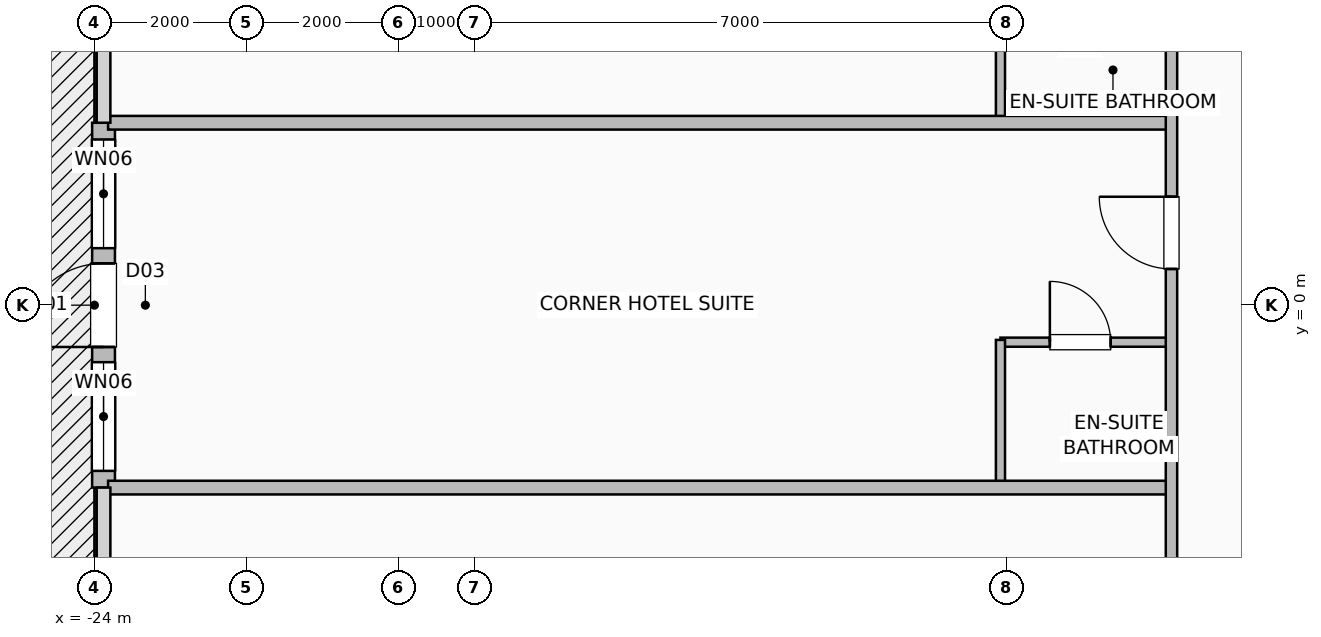
"""IFC4 building model, lengths in metres.
Left out: names, types, materials, properties, quantities, classifications, styles, units other than length and angle.
Written with IfcOpenShell. Run it as: python <this file> out.ifc"""

import sys

from ifc_helpers import new_model, si_unit, direction, frame, frame_2d, origin, place, context, subcontext, project, spatial, rectangle, extrude, element, fill, save


model = new_model("IFC4")
c1 = context("Model", 3, precision=1e-05, world=origin(), true_north=direction((0.0, 1.0)))
c2 = subcontext(c1, "Body", "Model", "MODEL_VIEW")
j1 = project(units=[si_unit("LENGTHUNIT", "METRE"), si_unit("PLANEANGLEUNIT", "RADIAN")], contexts=[c1])
p1 = place(None, origin())
s1 = spatial("IfcSite", under=j1, at=p1, CompositionType="ELEMENT")
p2 = place(p1, origin())
s2 = spatial("IfcBuilding", under=s1, at=p2, CompositionType="ELEMENT")
p3 = place(p2, frame((0.0, 0.0, 27.0)))
s3 = spatial("IfcBuildingStorey", under=s2, at=p3, CompositionType="ELEMENT", Elevation=27.0)
p4 = place(p3, frame((-23.88, -2.4, 0.0), z_axis=(0.0, 0.0, 1.0), x_axis=(0.0, 1.0, 0.0)))
e1 = element("IfcWall", 1, at=p4, inside=s3, PredefinedType="SOLIDWALL", context=c2, shape_type="SweptSolid", body=[
    extrude(rectangle(XDim=4.8, YDim=0.3, at=frame_2d((2.4, 0.0))), origin(), (0.0, 0.0, 1.0), 3.25),
])
p5 = place(p4, frame((1.85, 0.0, 0.0)))
e2 = element("IfcOpeningElement", 2, at=p5, cuts=e1, PredefinedType="OPENING", context=c2, shape_type="SweptSolid", body=[
    extrude(rectangle(XDim=1.1, YDim=2.2, at=frame_2d((0.55, 1.1))), frame((0.0, 0.16, 0.0), z_axis=(0.0, -1.0, 0.0), x_axis=(1.0, 0.0, 0.0)), (0.0, 0.0, 1.0), 0.32),
])
p6 = place(p4, frame((0.22, 0.0, 0.85)))
e3 = element("IfcOpeningElement", 3, at=p6, cuts=e1, PredefinedType="OPENING", context=c2, shape_type="SweptSolid", body=[
    extrude(rectangle(XDim=1.43, YDim=1.8, at=frame_2d((0.715, 0.9))), frame((0.0, 0.16, 0.0), z_axis=(0.0, -1.0, 0.0), x_axis=(1.0, 0.0, 0.0)), (0.0, 0.0, 1.0), 0.32),
])
p7 = place(p4, frame((3.15, 0.0, 0.85)))
e4 = element("IfcOpeningElement", 4, at=p7, cuts=e1, PredefinedType="OPENING", context=c2, shape_type="SweptSolid", body=[
    extrude(rectangle(XDim=1.43, YDim=1.8, at=frame_2d((0.715, 0.9))), frame((0.0, 0.16, 0.0), z_axis=(0.0, -1.0, 0.0), x_axis=(1.0, 0.0, 0.0)), (0.0, 0.0, 1.0), 0.32),
])
p8 = place(p3, frame((-12.08, -0.487, 0.0), z_axis=(0.0, 0.0, 1.0), x_axis=(1.0, 0.0, 0.0)))
e5 = element("IfcWall", 5, at=p8, inside=s3, PredefinedType="PLUMBINGWALL", context=c2, shape_type="SweptSolid", body=[
    extrude(rectangle(XDim=2.25, YDim=0.12, at=frame_2d((1.125, 0.0))), origin(), (0.0, 0.0, 1.0), 3.25),
])
p9 = place(p8, frame((0.65, 0.0, 0.0)))
e6 = element("IfcOpeningElement", 6, at=p9, cuts=e5, PredefinedType="OPENING", context=c2, shape_type="SweptSolid", body=[
    extrude(rectangle(XDim=0.8, YDim=2.05, at=frame_2d((0.4, 1.025))), frame((0.0, 0.07, 0.0), z_axis=(0.0, -1.0, 0.0), x_axis=(1.0, 0.0, 0.0)), (0.0, 0.0, 1.0), 0.14),
])
p10 = place(p3, frame((-12.08, -2.37, 0.0), z_axis=(0.0, 0.0, 1.0), x_axis=(0.0, 1.0, 0.0)))
e7 = element("IfcWall", 7, at=p10, inside=s3, PredefinedType="PLUMBINGWALL", context=c2, shape_type="SweptSolid", body=[
    extrude(rectangle(XDim=1.913, YDim=0.12, at=frame_2d((0.957, 0.0))), origin(), (0.0, 0.0, 1.0), 3.25),
])
p11 = place(p3, frame((-12.08, 2.43, 0.0), z_axis=(0.0, 0.0, 1.0), x_axis=(0.0, 1.0, 0.0)))
e8 = element("IfcWall", 8, at=p11, inside=s3, PredefinedType="PLUMBINGWALL", context=c2, shape_type="SweptSolid", body=[
    extrude(rectangle(XDim=2.008, YDim=0.12, at=frame_2d((1.004, 0.0))), origin(), (0.0, 0.0, 1.0), 3.25),
])
for number, where, z_axis, x_axis in (
    (9, (-23.82, -2.4, 0.0), (0.0, 0.0, 1.0), (1.0, 0.0, 0.0)),
    (10, (-23.82, 2.4, 0.0), (0.0, 0.0, 1.0), (1.0, 0.0, 0.0)),
):
    element("IfcWall", number, at=place(p3, frame(where, z_axis=z_axis, x_axis=x_axis)), inside=s3, PredefinedType="PARTITIONING", context=c2, shape_type="SweptSolid", body=[
        extrude(rectangle(XDim=13.99, YDim=0.18, at=frame_2d((6.995, 0.0))), origin(), (0.0, 0.0, 1.0), 3.25),
    ])
p12 = place(p3, frame((-9.83, -7.45, 0.0), z_axis=(0.0, 0.0, 1.0), x_axis=(0.0, 1.0, 0.0)))
e11 = element("IfcWall", 11, at=p12, inside=s3, PredefinedType="PARTITIONING", context=c2, shape_type="SweptSolid", body=[
    extrude(rectangle(XDim=14.9, YDim=0.15, at=frame_2d((7.45, 0.0))), origin(), (0.0, 0.0, 1.0), 3.25),
])
p13 = place(p12, frame((3.049, 0.0, 0.0)))
e12 = element("IfcOpeningElement", 12, at=p13, cuts=e11, PredefinedType="OPENING", context=c2, shape_type="SweptSolid", body=[
    extrude(rectangle(XDim=0.95, YDim=2.08, at=frame_2d((0.475, 1.04))), frame((0.0, 0.085, 0.0), z_axis=(0.0, -1.0, 0.0), x_axis=(1.0, 0.0, 0.0)), (0.0, 0.0, 1.0), 0.17),
])
p14 = place(p12, frame((7.927, 0.0, 0.0)))
e13 = element("IfcOpeningElement", 13, at=p14, cuts=e11, PredefinedType="OPENING", context=c2, shape_type="SweptSolid", body=[
    extrude(rectangle(XDim=0.95, YDim=2.08, at=frame_2d((0.475, 1.04))), frame((0.0, 0.085, 0.0), z_axis=(0.0, -1.0, 0.0), x_axis=(1.0, 0.0, 0.0)), (0.0, 0.0, 1.0), 0.17),
])
p15 = place(p12, frame((12.899, 0.0, 0.0)))
e14 = element("IfcOpeningElement", 14, at=p15, cuts=e11, PredefinedType="OPENING", context=c2, shape_type="SweptSolid", body=[
    extrude(rectangle(XDim=0.95, YDim=2.08, at=frame_2d((0.475, 1.04))), frame((0.0, 0.085, 0.0), z_axis=(0.0, -1.0, 0.0), x_axis=(1.0, 0.0, 0.0)), (0.0, 0.0, 1.0), 0.17),
])
p16 = place(p5, origin())
e15 = element("IfcDoor", 15, at=p16, inside=s3, OperationType="SINGLE_SWING_LEFT", PredefinedType="DOOR", context=c2, shape_type="SweptSolid", body=[
    extrude(rectangle(XDim=1.1, YDim=2.2, at=frame_2d((0.55, 1.1))), frame((0.0, 0.025, 0.0), z_axis=(0.0, -1.0, 0.0), x_axis=(1.0, 0.0, 0.0)), (0.0, 0.0, 1.0), 0.05),
])
fill(e2, e15)
p17 = place(p6, origin())
e16 = element("IfcWindow", 16, at=p17, inside=s3, PartitioningType="SINGLE_PANEL", PredefinedType="WINDOW", context=c2, shape_type="SweptSolid", body=[
    extrude(rectangle(XDim=1.43, YDim=1.8, at=frame_2d((0.715, 0.9))), frame((0.0, 0.03, 0.0), z_axis=(0.0, -1.0, 0.0), x_axis=(1.0, 0.0, 0.0)), (0.0, 0.0, 1.0), 0.06),
])
fill(e3, e16)
p18 = place(p7, origin())
e17 = element("IfcWindow", 17, at=p18, inside=s3, PartitioningType="SINGLE_PANEL", PredefinedType="WINDOW", context=c2, shape_type="SweptSolid", body=[
    extrude(rectangle(XDim=1.43, YDim=1.8, at=frame_2d((0.715, 0.9))), frame((0.0, 0.03, 0.0), z_axis=(0.0, -1.0, 0.0), x_axis=(1.0, 0.0, 0.0)), (0.0, 0.0, 1.0), 0.06),
])
fill(e4, e17)
p19 = place(p9, origin())
e18 = element("IfcDoor", 18, at=p19, inside=s3, OperationType="SINGLE_SWING_LEFT", PredefinedType="DOOR", context=c2, shape_type="SweptSolid", body=[
    extrude(rectangle(XDim=0.8, YDim=2.05, at=frame_2d((0.4, 1.025))), frame((0.0, 0.025, 0.0), z_axis=(0.0, -1.0, 0.0), x_axis=(1.0, 0.0, 0.0)), (0.0, 0.0, 1.0), 0.05),
])
fill(e6, e18)
p20 = place(p14, origin())
e19 = element("IfcDoor", 19, at=p20, inside=s3, OperationType="SINGLE_SWING_RIGHT", PredefinedType="DOOR", context=c2, shape_type="SweptSolid", body=[
    extrude(rectangle(XDim=0.95, YDim=2.08, at=frame_2d((0.475, 1.04))), frame((0.0, 0.025, 0.0), z_axis=(0.0, -1.0, 0.0), x_axis=(1.0, 0.0, 0.0)), (0.0, 0.0, 1.0), 0.05),
])
fill(e13, e19)
save(model, sys.argv[1])
